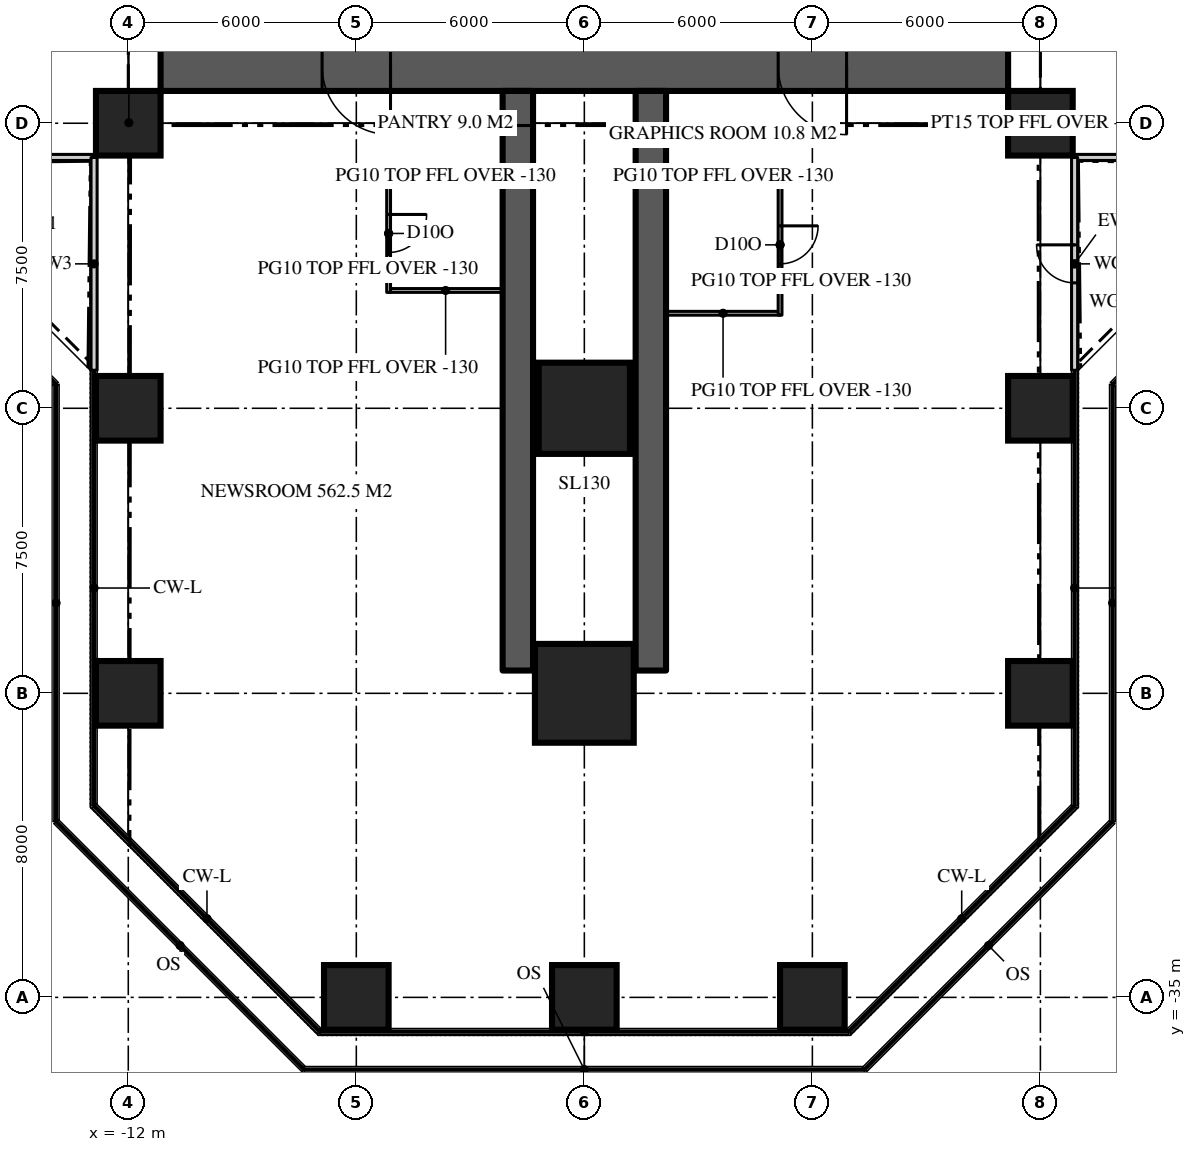
"""IFC4 building model, lengths in metres.
Left out: names, types, materials, properties, quantities, classifications, styles, units other than length and angle.
Written with IfcOpenShell. Run it as: python <this file> out.ifc"""

import sys

from ifc_helpers import new_model, si_unit, direction, frame, frame_2d, origin, origin_2d, place, context, subcontext, project, spatial, rectangle, extrude, element, fill, save


model = new_model("IFC4")
c1 = context("Model", 3, precision=1e-05, world=origin(), true_north=direction((0.0, 1.0)))
c2 = subcontext(c1, "Body", "Model", "MODEL_VIEW")
j1 = project(units=[si_unit("LENGTHUNIT", "METRE"), si_unit("PLANEANGLEUNIT", "RADIAN")], contexts=[c1])
p1 = place(None, origin())
s1 = spatial("IfcSite", under=j1, at=p1, CompositionType="ELEMENT")
p2 = place(p1, origin())
s2 = spatial("IfcBuilding", under=s1, at=p2, CompositionType="ELEMENT")
p3 = place(p2, frame((0.0, 0.0, 43.5)))
s3 = spatial("IfcBuildingStorey", under=s2, at=p3, CompositionType="ELEMENT", Elevation=43.5)
p4 = place(p3, frame((11.15, -10.5, 0.0), z_axis=(0.0, 0.0, 1.0), x_axis=(-1.0, 0.0, 0.0)))
e1 = element("IfcWall", 1, at=p4, inside=s3, PredefinedType="SHEAR", context=c2, shape_type="SweptSolid", body=[
    extrude(rectangle(XDim=22.3, YDim=1.3, at=frame_2d((11.15, 0.0))), origin(), (0.0, 0.0, 1.0), 3.9),
])
p5 = place(p4, frame((16.25, 0.0, 0.0)))
e2 = element("IfcOpeningElement", 2, at=p5, cuts=e1, PredefinedType="OPENING", context=c2, shape_type="SweptSolid", body=[
    extrude(rectangle(XDim=1.8, YDim=2.2, at=frame_2d((0.9, 1.1))), frame((0.0, 0.66, 0.0), z_axis=(0.0, -1.0, 0.0), x_axis=(1.0, 0.0, 0.0)), (0.0, 0.0, 1.0), 1.32),
])
p6 = place(p4, frame((4.25, 0.0, 0.0)))
e3 = element("IfcOpeningElement", 3, at=p6, cuts=e1, PredefinedType="OPENING", context=c2, shape_type="SweptSolid", body=[
    extrude(rectangle(XDim=1.8, YDim=2.2, at=frame_2d((0.9, 1.1))), frame((0.0, 0.66, 0.0), z_axis=(0.0, -1.0, 0.0), x_axis=(1.0, 0.0, 0.0)), (0.0, 0.0, 1.0), 1.32),
])
for number, where, z_axis, x_axis in (
    (4, (-1.75, -11.15, 0.0), (0.0, 0.0, 1.0), (0.0, -1.0, 0.0)),
    (5, (1.75, -11.15, 0.0), (0.0, 0.0, 1.0), (0.0, -1.0, 0.0)),
):
    element("IfcWall", number, at=place(p3, frame(where, z_axis=z_axis, x_axis=x_axis)), inside=s3, PredefinedType="SHEAR", context=c2, shape_type="SweptSolid", body=[
        extrude(rectangle(XDim=15.25, YDim=0.8, at=frame_2d((7.625, 0.0))), origin(), (0.0, 0.0, 1.0), 3.9),
    ])
for number, where, z_axis, x_axis in (
    (6, (-6.0, -35.0, 0.0), (0.0, 0.0, 1.0), (1.0, 0.0, 0.0)),
    (7, (0.0, -35.0, 0.0), (0.0, 0.0, 1.0), (1.0, 0.0, 0.0)),
    (8, (6.0, -35.0, 0.0), (0.0, 0.0, 1.0), (1.0, 0.0, 0.0)),
    (9, (-12.0, -27.0, 0.0), (0.0, 0.0, 1.0), (1.0, 0.0, 0.0)),
):
    element("IfcColumn", number, at=place(p3, frame(where, z_axis=z_axis, x_axis=x_axis)), inside=s3, PredefinedType="COLUMN", context=c2, shape_type="SweptSolid", body=[
        extrude(rectangle(XDim=1.7, YDim=1.7, at=origin_2d()), origin(), (0.0, 0.0, 1.0), 3.9),
    ])
p7 = place(p3, frame((0.0, -27.0, 0.0), z_axis=(0.0, 0.0, 1.0), x_axis=(1.0, 0.0, 0.0)))
e10 = element("IfcColumn", 10, at=p7, inside=s3, PredefinedType="COLUMN", context=c2, shape_type="SweptSolid", body=[
    extrude(rectangle(XDim=2.6, YDim=2.6, at=origin_2d()), origin(), (0.0, 0.0, 1.0), 3.9),
])
for number, where, z_axis, x_axis in (
    (11, (12.0, -27.0, 0.0), (0.0, 0.0, 1.0), (1.0, 0.0, 0.0)),
    (12, (-12.0, -19.5, 0.0), (0.0, 0.0, 1.0), (1.0, 0.0, 0.0)),
):
    element("IfcColumn", number, at=place(p3, frame(where, z_axis=z_axis, x_axis=x_axis)), inside=s3, PredefinedType="COLUMN", context=c2, shape_type="SweptSolid", body=[
        extrude(rectangle(XDim=1.7, YDim=1.7, at=origin_2d()), origin(), (0.0, 0.0, 1.0), 3.9),
    ])
p8 = place(p3, frame((0.0, -19.5, 0.0), z_axis=(0.0, 0.0, 1.0), x_axis=(1.0, 0.0, 0.0)))
e13 = element("IfcColumn", 13, at=p8, inside=s3, PredefinedType="COLUMN", context=c2, shape_type="SweptSolid", body=[
    extrude(rectangle(XDim=2.4, YDim=2.4, at=origin_2d()), origin(), (0.0, 0.0, 1.0), 3.9),
])
for number, where, z_axis, x_axis in (
    (14, (12.0, -19.5, 0.0), (0.0, 0.0, 1.0), (1.0, 0.0, 0.0)),
    (15, (-12.0, -12.0, 0.0), (0.0, 0.0, 1.0), (1.0, 0.0, 0.0)),
    (16, (12.0, -12.0, 0.0), (0.0, 0.0, 1.0), (1.0, 0.0, 0.0)),
):
    element("IfcColumn", number, at=place(p3, frame(where, z_axis=z_axis, x_axis=x_axis)), inside=s3, PredefinedType="COLUMN", context=c2, shape_type="SweptSolid", body=[
        extrude(rectangle(XDim=1.7, YDim=1.7, at=origin_2d()), origin(), (0.0, 0.0, 1.0), 3.9),
    ])
p9 = place(p3, frame((12.9, -12.9, 0.0), z_axis=(0.0, 0.0, 1.0), x_axis=(1.0, 0.0, 0.0)))
e17 = element("IfcWall", 17, at=p9, inside=s3, PredefinedType="SOLIDWALL", context=c2, shape_type="SweptSolid", body=[
    extrude(rectangle(XDim=5.6, YDim=0.16, at=frame_2d((2.8, 0.0))), origin(), (0.0, 0.0, 1.0), 3.77),
])
p10 = place(p3, frame((-18.5, -12.9, 0.0), z_axis=(0.0, 0.0, 1.0), x_axis=(1.0, 0.0, 0.0)))
e18 = element("IfcWall", 18, at=p10, inside=s3, PredefinedType="SOLIDWALL", context=c2, shape_type="SweptSolid", body=[
    extrude(rectangle(XDim=5.6, YDim=0.16, at=frame_2d((2.8, 0.0))), origin(), (0.0, 0.0, 1.0), 3.77),
])
p11 = place(p10, frame((2.3, 0.0, 0.0)))
e19 = element("IfcOpeningElement", 19, at=p11, cuts=e18, PredefinedType="OPENING", context=c2, shape_type="SweptSolid", body=[
    extrude(rectangle(XDim=1.0, YDim=2.2, at=frame_2d((0.5, 1.1))), frame((0.0, 0.09, 0.0), z_axis=(0.0, -1.0, 0.0), x_axis=(1.0, 0.0, 0.0)), (0.0, 0.0, 1.0), 0.18),
])
p12 = place(p3, frame((-12.9, -12.9, 0.0), z_axis=(0.0, 0.0, 1.0), x_axis=(0.0, -1.0, 0.0)))
e20 = element("IfcWall", 20, at=p12, inside=s3, PredefinedType="SOLIDWALL", context=c2, shape_type="SweptSolid", body=[
    extrude(rectangle(XDim=5.6, YDim=0.16, at=frame_2d((2.8, 0.0))), origin(), (0.0, 0.0, 1.0), 3.77),
])
p13 = place(p3, frame((12.9, -18.5, 0.0), z_axis=(0.0, 0.0, 1.0), x_axis=(0.0, 1.0, 0.0)))
e21 = element("IfcWall", 21, at=p13, inside=s3, PredefinedType="SOLIDWALL", context=c2, shape_type="SweptSolid", body=[
    extrude(rectangle(XDim=5.6, YDim=0.16, at=frame_2d((2.8, 0.0))), origin(), (0.0, 0.0, 1.0), 3.77),
])
p14 = place(p13, frame((2.3, 0.0, 0.0)))
e22 = element("IfcOpeningElement", 22, at=p14, cuts=e21, PredefinedType="OPENING", context=c2, shape_type="SweptSolid", body=[
    extrude(rectangle(XDim=1.0, YDim=2.2, at=frame_2d((0.5, 1.1))), frame((0.0, 0.09, 0.0), z_axis=(0.0, -1.0, 0.0), x_axis=(1.0, 0.0, 0.0)), (0.0, 0.0, 1.0), 0.18),
])
for number, where, z_axis, x_axis in (
    (23, (2.15, -13.4, 0.0), (0.0, 0.0, 1.0), (1.0, 0.0, 0.0)),
    (24, (2.15, -17.0, 0.0), (0.0, 0.0, 1.0), (1.0, 0.0, 0.0)),
):
    element("IfcWall", number, at=place(p3, frame(where, z_axis=z_axis, x_axis=x_axis)), inside=s3, PredefinedType="PARTITIONING", context=c2, shape_type="SweptSolid", body=[
        extrude(rectangle(XDim=3.0, YDim=0.1, at=frame_2d((1.5, 0.0))), origin(), (0.0, 0.0, 1.0), 3.77),
    ])
p15 = place(p3, frame((5.15, -13.35, 0.0), z_axis=(0.0, 0.0, 1.0), x_axis=(0.0, -1.0, 0.0)))
e25 = element("IfcWall", 25, at=p15, inside=s3, PredefinedType="PARTITIONING", context=c2, shape_type="SweptSolid", body=[
    extrude(rectangle(XDim=3.7, YDim=0.1, at=frame_2d((1.85, 0.0))), origin(), (0.0, 0.0, 1.0), 3.77),
])
p16 = place(p15, frame((1.35, 0.0, 0.0)))
e26 = element("IfcOpeningElement", 26, at=p16, cuts=e25, PredefinedType="OPENING", context=c2, shape_type="SweptSolid", body=[
    extrude(rectangle(XDim=1.0, YDim=2.2, at=frame_2d((0.5, 1.1))), frame((0.0, 0.06, 0.0), z_axis=(0.0, -1.0, 0.0), x_axis=(1.0, 0.0, 0.0)), (0.0, 0.0, 1.0), 0.12),
])
for number, where, z_axis, x_axis in (
    (27, (-2.15, -13.4, 0.0), (0.0, 0.0, 1.0), (-1.0, 0.0, 0.0)),
    (28, (-2.15, -16.4, 0.0), (0.0, 0.0, 1.0), (-1.0, 0.0, 0.0)),
):
    element("IfcWall", number, at=place(p3, frame(where, z_axis=z_axis, x_axis=x_axis)), inside=s3, PredefinedType="PARTITIONING", context=c2, shape_type="SweptSolid", body=[
        extrude(rectangle(XDim=3.0, YDim=0.1, at=frame_2d((1.5, 0.0))), origin(), (0.0, 0.0, 1.0), 3.77),
    ])
p17 = place(p3, frame((-5.15, -13.35, 0.0), z_axis=(0.0, 0.0, 1.0), x_axis=(0.0, -1.0, 0.0)))
e29 = element("IfcWall", 29, at=p17, inside=s3, PredefinedType="PARTITIONING", context=c2, shape_type="SweptSolid", body=[
    extrude(rectangle(XDim=3.1, YDim=0.1, at=frame_2d((1.55, 0.0))), origin(), (0.0, 0.0, 1.0), 3.77),
])
p18 = place(p17, frame((1.05, 0.0, 0.0)))
e30 = element("IfcOpeningElement", 30, at=p18, cuts=e29, PredefinedType="OPENING", context=c2, shape_type="SweptSolid", body=[
    extrude(rectangle(XDim=1.0, YDim=2.2, at=frame_2d((0.5, 1.1))), frame((0.0, 0.06, 0.0), z_axis=(0.0, -1.0, 0.0), x_axis=(1.0, 0.0, 0.0)), (0.0, 0.0, 1.0), 0.12),
])
for number, where, z_axis, x_axis in (
    (31, (-11.15, -11.15, 0.0), (0.0, 0.0, 1.0), (-0.707, -0.707, 0.0)),
    (32, (11.15, -11.15, 0.0), (0.0, 0.0, 1.0), (0.707, -0.707, 0.0)),
):
    element("IfcWall", number, at=place(p3, frame(where, z_axis=z_axis, x_axis=x_axis)), inside=s3, PredefinedType="PARTITIONING", context=c2, shape_type="SweptSolid", body=[
        extrude(rectangle(XDim=2.362, YDim=0.15, at=frame_2d((1.181, 0.0))), origin(), (0.0, 0.0, 1.0), 3.22),
    ])
p19 = place(p14, origin())
e33 = element("IfcDoor", 33, at=p19, inside=s3, OperationType="SINGLE_SWING_RIGHT", PredefinedType="DOOR", context=c2, shape_type="SweptSolid", body=[
    extrude(rectangle(XDim=1.0, YDim=2.2, at=frame_2d((0.5, 1.1))), frame((0.0, 0.025, 0.0), z_axis=(0.0, -1.0, 0.0), x_axis=(1.0, 0.0, 0.0)), (0.0, 0.0, 1.0), 0.05),
])
fill(e22, e33)
p20 = place(p5, origin())
e34 = element("IfcDoor", 34, at=p20, inside=s3, OperationType="DOUBLE_DOOR_DOUBLE_SWING", PredefinedType="DOOR", context=c2, shape_type="SweptSolid", body=[
    extrude(rectangle(XDim=1.8, YDim=2.2, at=frame_2d((0.9, 1.1))), frame((0.0, 0.025, 0.0), z_axis=(0.0, -1.0, 0.0), x_axis=(1.0, 0.0, 0.0)), (0.0, 0.0, 1.0), 0.05),
])
fill(e2, e34)
p21 = place(p6, origin())
e35 = element("IfcDoor", 35, at=p21, inside=s3, OperationType="DOUBLE_DOOR_DOUBLE_SWING", PredefinedType="DOOR", context=c2, shape_type="SweptSolid", body=[
    extrude(rectangle(XDim=1.8, YDim=2.2, at=frame_2d((0.9, 1.1))), frame((0.0, 0.025, 0.0), z_axis=(0.0, -1.0, 0.0), x_axis=(1.0, 0.0, 0.0)), (0.0, 0.0, 1.0), 0.05),
])
fill(e3, e35)
p22 = place(p16, origin())
e36 = element("IfcDoor", 36, at=p22, inside=s3, OperationType="SINGLE_SWING_LEFT", PredefinedType="DOOR", context=c2, shape_type="SweptSolid", body=[
    extrude(rectangle(XDim=1.0, YDim=2.2, at=frame_2d((0.5, 1.1))), frame((0.0, 0.025, 0.0), z_axis=(0.0, -1.0, 0.0), x_axis=(1.0, 0.0, 0.0)), (0.0, 0.0, 1.0), 0.05),
])
fill(e26, e36)
p23 = place(p18, origin())
e37 = element("IfcDoor", 37, at=p23, inside=s3, OperationType="SINGLE_SWING_LEFT", PredefinedType="DOOR", context=c2, shape_type="SweptSolid", body=[
    extrude(rectangle(XDim=1.0, YDim=2.2, at=frame_2d((0.5, 1.1))), frame((0.0, 0.025, 0.0), z_axis=(0.0, -1.0, 0.0), x_axis=(1.0, 0.0, 0.0)), (0.0, 0.0, 1.0), 0.05),
])
fill(e30, e37)
save(model, sys.argv[1])
